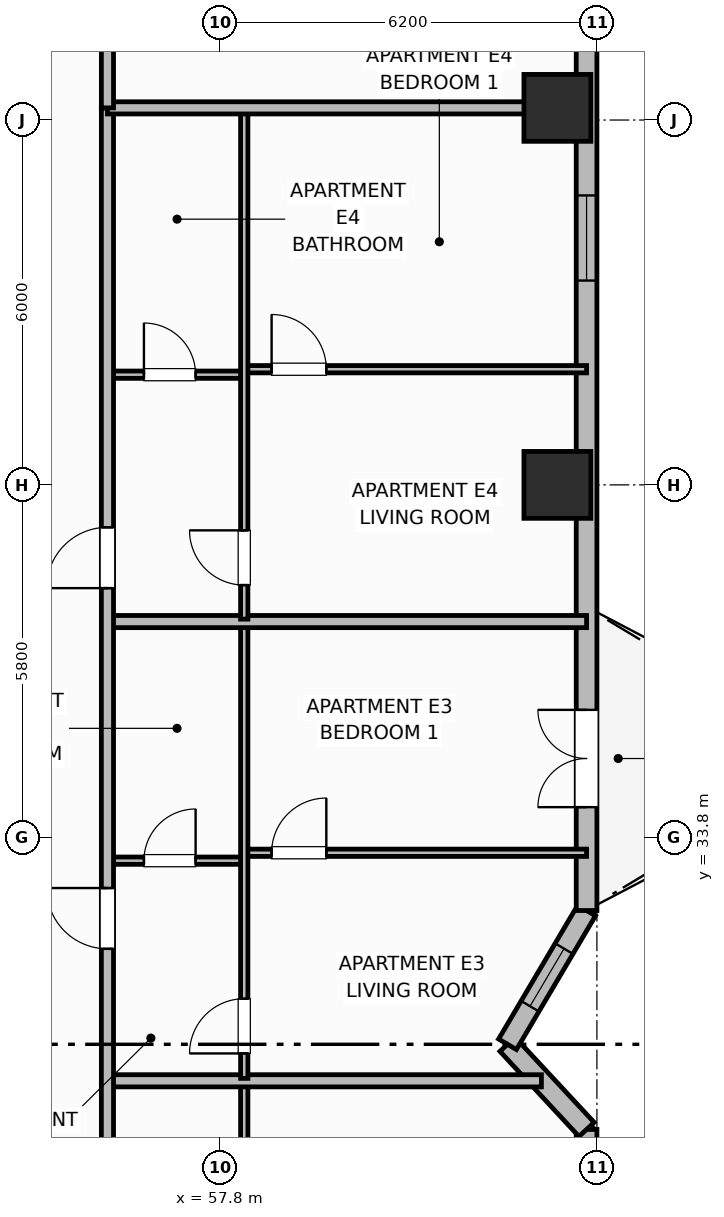
"""IFC4 building model, lengths in metres.
Left out: names, types, materials, properties, quantities, classifications, styles, units other than length and angle.
Written with IfcOpenShell. Run it as: python <this file> out.ifc"""

import sys

from ifc_helpers import new_model, si_unit, direction, frame, frame_2d, origin, origin_2d, place, context, subcontext, project, spatial, rectangle, extrude, element, fill, save


model = new_model("IFC4")
c1 = context("Model", 3, precision=1e-05, world=origin(), true_north=direction((0.0, 1.0)))
c2 = subcontext(c1, "Body", "Model", "MODEL_VIEW")
j1 = project(units=[si_unit("LENGTHUNIT", "METRE"), si_unit("PLANEANGLEUNIT", "RADIAN")], contexts=[c1])
p1 = place(None, origin())
s1 = spatial("IfcSite", under=j1, at=p1, CompositionType="ELEMENT")
p2 = place(p1, origin())
s2 = spatial("IfcBuilding", under=s1, at=p2, CompositionType="ELEMENT")
p3 = place(p2, frame((0.0, 0.0, 114.2)))
s3 = spatial("IfcBuildingStorey", under=s2, at=p3, CompositionType="ELEMENT", Elevation=114.2)
for number, where, z_axis, x_axis in (
    (1, (63.35, 39.6, 0.0), (0.0, 0.0, 1.0), (1.0, 0.0, 0.0)),
    (2, (63.35, 45.8, 0.0), (0.0, 0.0, 1.0), (1.0, 0.0, 0.0)),
):
    element("IfcColumn", number, at=place(p3, frame(where, z_axis=z_axis, x_axis=x_axis)), inside=s3, PredefinedType="COLUMN", context=c2, shape_type="SweptSolid", body=[
        extrude(rectangle(XDim=1.1, YDim=1.1, at=origin_2d()), origin(), (0.0, 0.0, 1.0), 3.7),
    ])
p4 = place(p3, frame((63.83, 27.4, 0.0), z_axis=(0.0, 0.0, 1.0), x_axis=(0.0, 1.0, 0.0)))
e3 = element("IfcWall", 3, at=p4, inside=s3, PredefinedType="SOLIDWALL", context=c2, shape_type="SweptSolid", body=[
    extrude(rectangle(XDim=1.6, YDim=0.34, at=frame_2d((0.8, 0.0))), origin(), (0.0, 0.0, 1.0), 2.7),
])
p5 = place(p3, frame((63.83, 29.0, 0.0), z_axis=(0.0, 0.0, 1.0), x_axis=(-0.68049031116, 0.732757078722, 0.0)))
e4 = element("IfcWall", 4, at=p5, inside=s3, PredefinedType="SOLIDWALL", context=c2, shape_type="SweptSolid", body=[
    extrude(rectangle(XDim=1.91, YDim=0.34, at=frame_2d((0.955, 0.0))), origin(), (0.0, 0.0, 1.0), 2.7),
])
p6 = place(p3, frame((62.53, 30.4, 0.0), z_axis=(0.0, 0.0, 1.0), x_axis=(0.508710000703, 0.860937939218, 0.0)))
e5 = element("IfcWall", 5, at=p6, inside=s3, PredefinedType="SOLIDWALL", context=c2, shape_type="SweptSolid", body=[
    extrude(rectangle(XDim=2.556, YDim=0.34, at=frame_2d((1.278, 0.0))), origin(), (0.0, 0.0, 1.0), 2.7),
])
p7 = place(p6, frame((0.728, 0.0, 0.89)))
e6 = element("IfcOpeningElement", 6, at=p7, cuts=e5, PredefinedType="OPENING", context=c2, shape_type="SweptSolid", body=[
    extrude(rectangle(XDim=1.1, YDim=1.65, at=frame_2d((0.55, 0.825))), frame((0.0, 0.18, 0.0), z_axis=(0.0, -1.0, 0.0), x_axis=(1.0, 0.0, 0.0)), (0.0, 0.0, 1.0), 0.36),
])
p8 = place(p3, frame((63.83, 32.6, 0.0), z_axis=(0.0, 0.0, 1.0), x_axis=(0.0, 1.0, 0.0)))
e7 = element("IfcWall", 7, at=p8, inside=s3, PredefinedType="SOLIDWALL", context=c2, shape_type="SweptSolid", body=[
    extrude(rectangle(XDim=14.8, YDim=0.34, at=frame_2d((7.4, 0.0))), origin(), (0.0, 0.0, 1.0), 2.7),
])
p9 = place(p8, frame((1.7, 0.0, 0.0)))
e8 = element("IfcOpeningElement", 8, at=p9, cuts=e7, PredefinedType="OPENING", context=c2, shape_type="SweptSolid", body=[
    extrude(rectangle(XDim=1.6, YDim=2.1, at=frame_2d((0.8, 1.05))), frame((0.0, 0.18, 0.0), z_axis=(0.0, -1.0, 0.0), x_axis=(1.0, 0.0, 0.0)), (0.0, 0.0, 1.0), 0.36),
])
p10 = place(p8, frame((10.36, 0.0, 0.69)))
e9 = element("IfcOpeningElement", 9, at=p10, cuts=e7, PredefinedType="OPENING", context=c2, shape_type="SweptSolid", body=[
    extrude(rectangle(XDim=1.4, YDim=1.85, at=frame_2d((0.7, 0.925))), frame((0.0, 0.18, 0.0), z_axis=(0.0, -1.0, 0.0), x_axis=(1.0, 0.0, 0.0)), (0.0, 0.0, 1.0), 0.36),
])
p11 = place(p3, frame((58.2, 19.792, 0.0), z_axis=(0.0, 0.0, 1.0), x_axis=(0.0, 1.0, 0.0)))
e10 = element("IfcWall", 10, at=p11, inside=s3, PredefinedType="PARTITIONING", context=c2, shape_type="SweptSolid", body=[
    extrude(rectangle(XDim=9.968, YDim=0.12, at=frame_2d((4.984, 0.0))), origin(), (0.0, 0.0, 1.0), 2.53),
])
p12 = place(p11, frame((0.41, 0.0, 0.0)))
e11 = element("IfcOpeningElement", 11, at=p12, cuts=e10, PredefinedType="OPENING", context=c2, shape_type="SweptSolid", body=[
    extrude(rectangle(XDim=0.9, YDim=2.1, at=frame_2d((0.45, 1.05))), frame((0.0, 0.07, 0.0), z_axis=(0.0, -1.0, 0.0), x_axis=(1.0, 0.0, 0.0)), (0.0, 0.0, 1.0), 0.14),
])
p13 = place(p3, frame((55.95, 29.8, 0.0), z_axis=(0.0, 0.0, 1.0), x_axis=(1.0, 0.0, 0.0)))
e12 = element("IfcWall", 12, at=p13, inside=s3, PredefinedType="PARTITIONING", context=c2, shape_type="SweptSolid", body=[
    extrude(rectangle(XDim=7.137, YDim=0.2, at=frame_2d((3.569, 0.0))), origin(), (0.0, 0.0, 1.0), 2.53),
])
p14 = place(p3, frame((55.95, 33.42, 0.0), z_axis=(0.0, 0.0, 1.0), x_axis=(1.0, 0.0, 0.0)))
e13 = element("IfcWall", 13, at=p14, inside=s3, PredefinedType="PARTITIONING", context=c2, shape_type="SweptSolid", body=[
    extrude(rectangle(XDim=2.25, YDim=0.12, at=frame_2d((1.125, 0.0))), origin(), (0.0, 0.0, 1.0), 2.53),
])
p15 = place(p14, frame((0.6, 0.0, 0.0)))
e14 = element("IfcOpeningElement", 14, at=p15, cuts=e13, PredefinedType="OPENING", context=c2, shape_type="SweptSolid", body=[
    extrude(rectangle(XDim=0.85, YDim=2.1, at=frame_2d((0.425, 1.05))), frame((0.0, 0.07, 0.0), z_axis=(0.0, -1.0, 0.0), x_axis=(1.0, 0.0, 0.0)), (0.0, 0.0, 1.0), 0.14),
])
p16 = place(p3, frame((58.2, 33.55, 0.0), z_axis=(0.0, 0.0, 1.0), x_axis=(1.0, 0.0, 0.0)))
e15 = element("IfcWall", 15, at=p16, inside=s3, PredefinedType="PARTITIONING", context=c2, shape_type="SweptSolid", body=[
    extrude(rectangle(XDim=5.63, YDim=0.12, at=frame_2d((2.815, 0.0))), origin(), (0.0, 0.0, 1.0), 2.53),
])
p17 = place(p16, frame((0.45, 0.0, 0.0)))
e16 = element("IfcOpeningElement", 16, at=p17, cuts=e15, PredefinedType="OPENING", context=c2, shape_type="SweptSolid", body=[
    extrude(rectangle(XDim=0.9, YDim=2.1, at=frame_2d((0.45, 1.05))), frame((0.0, 0.07, 0.0), z_axis=(0.0, -1.0, 0.0), x_axis=(1.0, 0.0, 0.0)), (0.0, 0.0, 1.0), 0.14),
])
p18 = place(p3, frame((58.2, 29.84, 0.0), z_axis=(0.0, 0.0, 1.0), x_axis=(0.0, 1.0, 0.0)))
e17 = element("IfcWall", 17, at=p18, inside=s3, PredefinedType="PARTITIONING", context=c2, shape_type="SweptSolid", body=[
    extrude(rectangle(XDim=7.472, YDim=0.12, at=frame_2d((3.736, 0.0))), origin(), (0.0, 0.0, 1.0), 2.53),
])
p19 = place(p18, frame((0.41, 0.0, 0.0)))
e18 = element("IfcOpeningElement", 18, at=p19, cuts=e17, PredefinedType="OPENING", context=c2, shape_type="SweptSolid", body=[
    extrude(rectangle(XDim=0.9, YDim=2.1, at=frame_2d((0.45, 1.05))), frame((0.0, 0.07, 0.0), z_axis=(0.0, -1.0, 0.0), x_axis=(1.0, 0.0, 0.0)), (0.0, 0.0, 1.0), 0.14),
])
p20 = place(p3, frame((55.95, 37.352, 0.0), z_axis=(0.0, 0.0, 1.0), x_axis=(1.0, 0.0, 0.0)))
e19 = element("IfcWall", 19, at=p20, inside=s3, PredefinedType="PARTITIONING", context=c2, shape_type="SweptSolid", body=[
    extrude(rectangle(XDim=7.88, YDim=0.2, at=frame_2d((3.94, 0.0))), origin(), (0.0, 0.0, 1.0), 2.53),
])
p21 = place(p3, frame((55.95, 41.412, 0.0), z_axis=(0.0, 0.0, 1.0), x_axis=(1.0, 0.0, 0.0)))
e20 = element("IfcWall", 20, at=p21, inside=s3, PredefinedType="PARTITIONING", context=c2, shape_type="SweptSolid", body=[
    extrude(rectangle(XDim=2.25, YDim=0.12, at=frame_2d((1.125, 0.0))), origin(), (0.0, 0.0, 1.0), 2.53),
])
p22 = place(p21, frame((0.6, 0.0, 0.0)))
e21 = element("IfcOpeningElement", 21, at=p22, cuts=e20, PredefinedType="OPENING", context=c2, shape_type="SweptSolid", body=[
    extrude(rectangle(XDim=0.85, YDim=2.1, at=frame_2d((0.425, 1.05))), frame((0.0, 0.07, 0.0), z_axis=(0.0, -1.0, 0.0), x_axis=(1.0, 0.0, 0.0)), (0.0, 0.0, 1.0), 0.14),
])
p23 = place(p3, frame((58.2, 41.502, 0.0), z_axis=(0.0, 0.0, 1.0), x_axis=(1.0, 0.0, 0.0)))
e22 = element("IfcWall", 22, at=p23, inside=s3, PredefinedType="PARTITIONING", context=c2, shape_type="SweptSolid", body=[
    extrude(rectangle(XDim=5.63, YDim=0.12, at=frame_2d((2.815, 0.0))), origin(), (0.0, 0.0, 1.0), 2.53),
])
p24 = place(p23, frame((0.45, 0.0, 0.0)))
e23 = element("IfcOpeningElement", 23, at=p24, cuts=e22, PredefinedType="OPENING", context=c2, shape_type="SweptSolid", body=[
    extrude(rectangle(XDim=0.9, YDim=2.1, at=frame_2d((0.45, 1.05))), frame((0.0, 0.07, 0.0), z_axis=(0.0, -1.0, 0.0), x_axis=(1.0, 0.0, 0.0)), (0.0, 0.0, 1.0), 0.14),
])
p25 = place(p3, frame((58.2, 37.392, 0.0), z_axis=(0.0, 0.0, 1.0), x_axis=(0.0, 1.0, 0.0)))
e24 = element("IfcWall", 24, at=p25, inside=s3, PredefinedType="PARTITIONING", context=c2, shape_type="SweptSolid", body=[
    extrude(rectangle(XDim=8.368, YDim=0.12, at=frame_2d((4.184, 0.0))), origin(), (0.0, 0.0, 1.0), 2.53),
])
p26 = place(p25, frame((0.56, 0.0, 0.0)))
e25 = element("IfcOpeningElement", 25, at=p26, cuts=e24, PredefinedType="OPENING", context=c2, shape_type="SweptSolid", body=[
    extrude(rectangle(XDim=0.9, YDim=2.1, at=frame_2d((0.45, 1.05))), frame((0.0, 0.07, 0.0), z_axis=(0.0, -1.0, 0.0), x_axis=(1.0, 0.0, 0.0)), (0.0, 0.0, 1.0), 0.14),
])
p27 = place(p3, frame((55.95, 10.6, 0.0), z_axis=(0.0, 0.0, 1.0), x_axis=(0.0, 1.0, 0.0)))
e26 = element("IfcWall", 26, at=p27, inside=s3, PredefinedType="PARTITIONING", context=c2, shape_type="SweptSolid", body=[
    extrude(rectangle(XDim=35.2, YDim=0.2, at=frame_2d((17.6, 0.0))), origin(), (0.0, 0.0, 1.0), 2.53),
])
p28 = place(p27, frame((2.65, 0.0, 0.0)))
e27 = element("IfcOpeningElement", 27, at=p28, cuts=e26, PredefinedType="OPENING", context=c2, shape_type="SweptSolid", body=[
    extrude(rectangle(XDim=1.0, YDim=2.15, at=frame_2d((0.5, 1.075))), frame((0.0, 0.11, 0.0), z_axis=(0.0, -1.0, 0.0), x_axis=(1.0, 0.0, 0.0)), (0.0, 0.0, 1.0), 0.22),
])
p29 = place(p27, frame((11.352, 0.0, 0.0)))
e28 = element("IfcOpeningElement", 28, at=p29, cuts=e26, PredefinedType="OPENING", context=c2, shape_type="SweptSolid", body=[
    extrude(rectangle(XDim=1.0, YDim=2.15, at=frame_2d((0.5, 1.075))), frame((0.0, 0.11, 0.0), z_axis=(0.0, -1.0, 0.0), x_axis=(1.0, 0.0, 0.0)), (0.0, 0.0, 1.0), 0.22),
])
p30 = place(p27, frame((21.37, 0.0, 0.0)))
e29 = element("IfcOpeningElement", 29, at=p30, cuts=e26, PredefinedType="OPENING", context=c2, shape_type="SweptSolid", body=[
    extrude(rectangle(XDim=1.0, YDim=2.15, at=frame_2d((0.5, 1.075))), frame((0.0, 0.11, 0.0), z_axis=(0.0, -1.0, 0.0), x_axis=(1.0, 0.0, 0.0)), (0.0, 0.0, 1.0), 0.22),
])
p31 = place(p27, frame((27.302, 0.0, 0.0)))
e30 = element("IfcOpeningElement", 30, at=p31, cuts=e26, PredefinedType="OPENING", context=c2, shape_type="SweptSolid", body=[
    extrude(rectangle(XDim=1.0, YDim=2.15, at=frame_2d((0.5, 1.075))), frame((0.0, 0.11, 0.0), z_axis=(0.0, -1.0, 0.0), x_axis=(1.0, 0.0, 0.0)), (0.0, 0.0, 1.0), 0.22),
])
p32 = place(p3, frame((55.95, 45.8, 0.0), z_axis=(0.0, 0.0, 1.0), x_axis=(1.0, 0.0, 0.0)))
e31 = element("IfcWall", 31, at=p32, inside=s3, PredefinedType="PARTITIONING", context=c2, shape_type="SweptSolid", body=[
    extrude(rectangle(XDim=7.46, YDim=0.2, at=frame_2d((3.73, 0.0))), origin(), (0.0, 0.0, 1.0), 2.53),
])
p33 = place(p3, frame((55.95, 45.8, 0.0), z_axis=(0.0, 0.0, 1.0), x_axis=(0.0, 1.0, 0.0)))
e32 = element("IfcWall", 32, at=p33, inside=s3, PredefinedType="PARTITIONING", context=c2, shape_type="SweptSolid", body=[
    extrude(rectangle(XDim=5.63, YDim=0.2, at=frame_2d((2.815, 0.0))), origin(), (0.0, 0.0, 1.0), 2.53),
])
p34 = place(p7, origin())
e33 = element("IfcWindow", 33, at=p34, inside=s3, PartitioningType="SINGLE_PANEL", PredefinedType="WINDOW", context=c2, shape_type="SweptSolid", body=[
    extrude(rectangle(XDim=1.1, YDim=1.65, at=frame_2d((0.55, 0.825))), frame((0.0, 0.03, 0.0), z_axis=(0.0, -1.0, 0.0), x_axis=(1.0, 0.0, 0.0)), (0.0, 0.0, 1.0), 0.06),
])
fill(e6, e33)
p35 = place(p9, origin())
e34 = element("IfcDoor", 34, at=p35, inside=s3, OperationType="DOUBLE_DOOR_SINGLE_SWING", PredefinedType="DOOR", context=c2, shape_type="SweptSolid", body=[
    extrude(rectangle(XDim=1.6, YDim=2.1, at=frame_2d((0.8, 1.05))), frame((0.0, 0.025, 0.0), z_axis=(0.0, -1.0, 0.0), x_axis=(1.0, 0.0, 0.0)), (0.0, 0.0, 1.0), 0.05),
])
fill(e8, e34)
p36 = place(p10, origin())
e35 = element("IfcWindow", 35, at=p36, inside=s3, PartitioningType="SINGLE_PANEL", PredefinedType="WINDOW", context=c2, shape_type="SweptSolid", body=[
    extrude(rectangle(XDim=1.4, YDim=1.85, at=frame_2d((0.7, 0.925))), frame((0.0, 0.03, 0.0), z_axis=(0.0, -1.0, 0.0), x_axis=(1.0, 0.0, 0.0)), (0.0, 0.0, 1.0), 0.06),
])
fill(e9, e35)
p37 = place(p15, origin())
e36 = element("IfcDoor", 36, at=p37, inside=s3, OperationType="SINGLE_SWING_RIGHT", PredefinedType="DOOR", context=c2, shape_type="SweptSolid", body=[
    extrude(rectangle(XDim=0.85, YDim=2.1, at=frame_2d((0.425, 1.05))), frame((0.0, 0.025, 0.0), z_axis=(0.0, -1.0, 0.0), x_axis=(1.0, 0.0, 0.0)), (0.0, 0.0, 1.0), 0.05),
])
fill(e14, e36)
p38 = place(p17, origin())
e37 = element("IfcDoor", 37, at=p38, inside=s3, OperationType="SINGLE_SWING_RIGHT", PredefinedType="DOOR", context=c2, shape_type="SweptSolid", body=[
    extrude(rectangle(XDim=0.9, YDim=2.1, at=frame_2d((0.45, 1.05))), frame((0.0, 0.025, 0.0), z_axis=(0.0, -1.0, 0.0), x_axis=(1.0, 0.0, 0.0)), (0.0, 0.0, 1.0), 0.05),
])
fill(e16, e37)
p39 = place(p19, origin())
e38 = element("IfcDoor", 38, at=p39, inside=s3, OperationType="SINGLE_SWING_LEFT", PredefinedType="DOOR", context=c2, shape_type="SweptSolid", body=[
    extrude(rectangle(XDim=0.9, YDim=2.1, at=frame_2d((0.45, 1.05))), frame((0.0, 0.025, 0.0), z_axis=(0.0, -1.0, 0.0), x_axis=(1.0, 0.0, 0.0)), (0.0, 0.0, 1.0), 0.05),
])
fill(e18, e38)
p40 = place(p22, origin())
e39 = element("IfcDoor", 39, at=p40, inside=s3, OperationType="SINGLE_SWING_LEFT", PredefinedType="DOOR", context=c2, shape_type="SweptSolid", body=[
    extrude(rectangle(XDim=0.85, YDim=2.1, at=frame_2d((0.425, 1.05))), frame((0.0, 0.025, 0.0), z_axis=(0.0, -1.0, 0.0), x_axis=(1.0, 0.0, 0.0)), (0.0, 0.0, 1.0), 0.05),
])
fill(e21, e39)
p41 = place(p24, origin())
e40 = element("IfcDoor", 40, at=p41, inside=s3, OperationType="SINGLE_SWING_LEFT", PredefinedType="DOOR", context=c2, shape_type="SweptSolid", body=[
    extrude(rectangle(XDim=0.9, YDim=2.1, at=frame_2d((0.45, 1.05))), frame((0.0, 0.025, 0.0), z_axis=(0.0, -1.0, 0.0), x_axis=(1.0, 0.0, 0.0)), (0.0, 0.0, 1.0), 0.05),
])
fill(e23, e40)
p42 = place(p26, origin())
e41 = element("IfcDoor", 41, at=p42, inside=s3, OperationType="SINGLE_SWING_RIGHT", PredefinedType="DOOR", context=c2, shape_type="SweptSolid", body=[
    extrude(rectangle(XDim=0.9, YDim=2.1, at=frame_2d((0.45, 1.05))), frame((0.0, 0.025, 0.0), z_axis=(0.0, -1.0, 0.0), x_axis=(1.0, 0.0, 0.0)), (0.0, 0.0, 1.0), 0.05),
])
fill(e25, e41)
p43 = place(p30, origin())
e42 = element("IfcDoor", 42, at=p43, inside=s3, OperationType="SINGLE_SWING_RIGHT", PredefinedType="DOOR", context=c2, shape_type="SweptSolid", body=[
    extrude(rectangle(XDim=1.0, YDim=2.15, at=frame_2d((0.5, 1.075))), frame((0.0, 0.025, 0.0), z_axis=(0.0, -1.0, 0.0), x_axis=(1.0, 0.0, 0.0)), (0.0, 0.0, 1.0), 0.05),
])
fill(e29, e42)
p44 = place(p31, origin())
e43 = element("IfcDoor", 43, at=p44, inside=s3, OperationType="SINGLE_SWING_LEFT", PredefinedType="DOOR", context=c2, shape_type="SweptSolid", body=[
    extrude(rectangle(XDim=1.0, YDim=2.15, at=frame_2d((0.5, 1.075))), frame((0.0, 0.025, 0.0), z_axis=(0.0, -1.0, 0.0), x_axis=(1.0, 0.0, 0.0)), (0.0, 0.0, 1.0), 0.05),
])
fill(e30, e43)
save(model, sys.argv[1])
